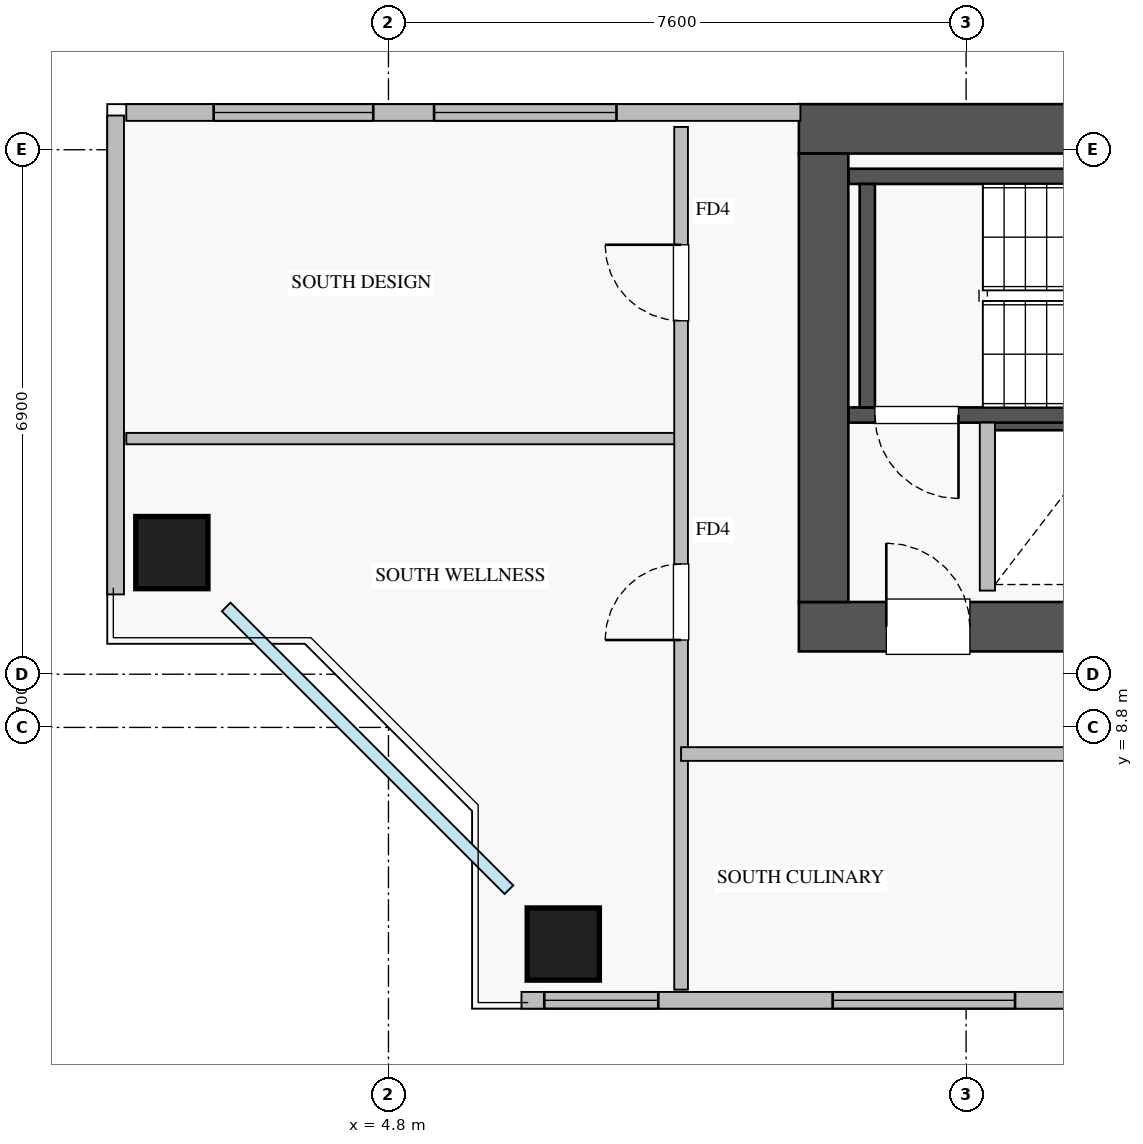
"""IFC4 building model, lengths in metres.
Left out: names, types, materials, properties, quantities, classifications, styles, units other than length and angle.
Written with IfcOpenShell. Run it as: python <this file> out.ifc"""

import sys

from ifc_helpers import new_model, si_unit, direction, frame, frame_2d, origin, origin_2d, place, context, subcontext, project, spatial, rectangle, extrude, source, transform, mapped, element, fill, save


model = new_model("IFC4")
c1 = context("Model", 3, precision=1e-05, world=origin(), true_north=direction((0.0, 1.0)))
c2 = subcontext(c1, "Body", "Model", "MODEL_VIEW")
j1 = project(units=[si_unit("LENGTHUNIT", "METRE"), si_unit("PLANEANGLEUNIT", "RADIAN")], contexts=[c1])
p1 = place(None, origin())
s1 = spatial("IfcSite", under=j1, at=p1, CompositionType="ELEMENT")
p2 = place(p1, origin())
s2 = spatial("IfcBuilding", under=s1, at=p2, CompositionType="ELEMENT")
p3 = place(p2, frame((0.0, 0.0, 163.25)))
s3 = spatial("IfcBuildingStorey", under=s2, at=p3, CompositionType="ELEMENT", Elevation=163.25)
p4 = place(p3, frame((12.68, 12.8, 0.0), z_axis=(0.0, 0.0, 1.0), x_axis=(1.0, 0.0, 0.0)))
e1 = element("IfcWall", 1, at=p4, inside=s3, PredefinedType="SHEAR", context=c2, shape_type="SweptSolid", body=[
    extrude(rectangle(XDim=1.94, YDim=0.18, at=frame_2d((0.97, 0.0))), origin(), (0.0, 0.0, 1.0), 3.07),
])
p5 = place(p3, frame((10.85, 12.91, 0.0), z_axis=(0.0, 0.0, 1.0), x_axis=(1.0, 0.0, 0.0)))
e2 = element("IfcWall", 2, at=p5, inside=s3, PredefinedType="SHEAR", context=c2, shape_type="SweptSolid", body=[
    extrude(rectangle(XDim=7.3, YDim=0.2, at=frame_2d((3.65, 0.0))), origin(), (0.0, 0.0, 1.0), 3.25),
])
p6 = place(p5, frame((0.35, 0.0, 0.0)))
e3 = element("IfcOpeningElement", 3, at=p6, cuts=e2, PredefinedType="OPENING", context=c2, shape_type="SweptSolid", body=[
    extrude(rectangle(XDim=1.1, YDim=2.05, at=frame_2d((0.55, 1.025))), frame((0.0, 0.11, 0.0), z_axis=(0.0, -1.0, 0.0), x_axis=(1.0, 0.0, 0.0)), (0.0, 0.0, 1.0), 0.22),
])
p7 = place(p3, frame((10.85, 16.05, 0.0), z_axis=(0.0, 0.0, 1.0), x_axis=(1.0, 0.0, 0.0)))
e4 = element("IfcWall", 4, at=p7, inside=s3, PredefinedType="SHEAR", context=c2, shape_type="SweptSolid", body=[
    extrude(rectangle(XDim=7.3, YDim=0.2, at=frame_2d((3.65, 0.0))), origin(), (0.0, 0.0, 1.0), 3.25),
])
p8 = place(p3, frame((11.1, 13.01, 0.0), z_axis=(0.0, 0.0, 1.0), x_axis=(0.0, 1.0, 0.0)))
e5 = element("IfcWall", 5, at=p8, inside=s3, PredefinedType="SHEAR", context=c2, shape_type="SweptSolid", body=[
    extrude(rectangle(XDim=2.94, YDim=0.2, at=frame_2d((1.47, 0.0))), origin(), (0.0, 0.0, 1.0), 3.25),
])
p9 = place(p3, frame((10.2, 10.125, 0.0), z_axis=(0.0, 0.0, 1.0), x_axis=(1.0, 0.0, 0.0)))
e6 = element("IfcWall", 6, at=p9, inside=s3, PredefinedType="SHEAR", context=c2, shape_type="SweptSolid", body=[
    extrude(rectangle(XDim=17.6, YDim=0.65, at=frame_2d((8.8, 0.0))), origin(), (0.0, 0.0, 1.0), 3.25),
])
p10 = place(p9, frame((1.15, 0.0, 0.0)))
e7 = element("IfcOpeningElement", 7, at=p10, cuts=e6, PredefinedType="OPENING", context=c2, shape_type="SweptSolid", body=[
    extrude(rectangle(XDim=1.1, YDim=2.05, at=frame_2d((0.55, 1.025))), frame((0.0, 0.335, 0.0), z_axis=(0.0, -1.0, 0.0), x_axis=(1.0, 0.0, 0.0)), (0.0, 0.0, 1.0), 0.67),
])
p11 = place(p9, frame((8.3, 0.0, 0.0)))
e8 = element("IfcOpeningElement", 8, at=p11, cuts=e6, PredefinedType="OPENING", context=c2, shape_type="SweptSolid", body=[
    extrude(rectangle(XDim=1.1, YDim=2.05, at=frame_2d((0.55, 1.025))), frame((0.0, 0.335, 0.0), z_axis=(0.0, -1.0, 0.0), x_axis=(1.0, 0.0, 0.0)), (0.0, 0.0, 1.0), 0.67),
])
p12 = place(p9, frame((4.9, 0.0, 0.0)))
e9 = element("IfcOpeningElement", 9, at=p12, cuts=e6, PredefinedType="OPENING", context=c2, shape_type="SweptSolid", body=[
    extrude(rectangle(XDim=1.1, YDim=2.05, at=frame_2d((0.55, 1.025))), frame((0.0, 0.335, 0.0), z_axis=(0.0, -1.0, 0.0), x_axis=(1.0, 0.0, 0.0)), (0.0, 0.0, 1.0), 0.67),
])
p13 = place(p9, frame((14.74, 0.0, 0.0)))
e10 = element("IfcOpeningElement", 10, at=p13, cuts=e6, PredefinedType="OPENING", context=c2, shape_type="SweptSolid", body=[
    extrude(rectangle(XDim=1.0, YDim=2.05, at=frame_2d((0.5, 1.025))), frame((0.0, 0.335, 0.0), z_axis=(0.0, -1.0, 0.0), x_axis=(1.0, 0.0, 0.0)), (0.0, 0.0, 1.0), 0.67),
])
p14 = place(p9, frame((10.155, 0.0, 0.0)))
e11 = element("IfcOpeningElement", 11, at=p14, cuts=e6, PredefinedType="OPENING", context=c2, shape_type="SweptSolid", body=[
    extrude(rectangle(XDim=1.0, YDim=2.05, at=frame_2d((0.5, 1.025))), frame((0.0, 0.335, 0.0), z_axis=(0.0, -1.0, 0.0), x_axis=(1.0, 0.0, 0.0)), (0.0, 0.0, 1.0), 0.67),
])
p15 = place(p9, frame((11.87, 0.0, 0.0)))
e12 = element("IfcOpeningElement", 12, at=p15, cuts=e6, PredefinedType="OPENING", context=c2, shape_type="SweptSolid", body=[
    extrude(rectangle(XDim=1.0, YDim=2.05, at=frame_2d((0.5, 1.025))), frame((0.0, 0.335, 0.0), z_axis=(0.0, -1.0, 0.0), x_axis=(1.0, 0.0, 0.0)), (0.0, 0.0, 1.0), 0.67),
])
p16 = place(p9, frame((13.46, 0.0, 0.0)))
e13 = element("IfcOpeningElement", 13, at=p16, cuts=e6, PredefinedType="OPENING", context=c2, shape_type="SweptSolid", body=[
    extrude(rectangle(XDim=1.0, YDim=2.05, at=frame_2d((0.5, 1.025))), frame((0.0, 0.335, 0.0), z_axis=(0.0, -1.0, 0.0), x_axis=(1.0, 0.0, 0.0)), (0.0, 0.0, 1.0), 0.67),
])
p17 = place(p3, frame((10.2, 16.675, 0.0), z_axis=(0.0, 0.0, 1.0), x_axis=(1.0, 0.0, 0.0)))
e14 = element("IfcWall", 14, at=p17, inside=s3, PredefinedType="SHEAR", context=c2, shape_type="SweptSolid", body=[
    extrude(rectangle(XDim=17.6, YDim=0.65, at=frame_2d((8.8, 0.0))), origin(), (0.0, 0.0, 1.0), 3.25),
])
p18 = place(p3, frame((10.525, 10.45, 0.0), z_axis=(0.0, 0.0, 1.0), x_axis=(0.0, 1.0, 0.0)))
e15 = element("IfcWall", 15, at=p18, inside=s3, PredefinedType="SHEAR", context=c2, shape_type="SweptSolid", body=[
    extrude(rectangle(XDim=5.9, YDim=0.65, at=frame_2d((2.95, 0.0))), origin(), (0.0, 0.0, 1.0), 3.25),
])
m1 = source(origin(), c2, "Body", "SweptSolid", [
    extrude(rectangle(XDim=0.95, YDim=0.95, at=origin_2d()), origin(), (0.0, 0.0, 1.0), 3.25),
])
for number, where, z_axis, x_axis in (
    (16, (7.1, 5.95, 0.0), (0.0, 0.0, 1.0), (1.0, 0.0, 0.0)),
    (17, (1.95, 11.1, 0.0), (0.0, 0.0, 1.0), (1.0, 0.0, 0.0)),
):
    element("IfcColumn", number, at=place(p3, frame(where, z_axis=z_axis, x_axis=x_axis)), inside=s3, PredefinedType="COLUMN", context=c2, shape_type="MappedRepresentation", body=[
        mapped(m1, transform((0.0, 0.0, 0.0), x_axis=(1.0, 0.0, 0.0), y_axis=(0.0, 1.0, 0.0), z_axis=(0.0, 0.0, 1.0), scale=1.0)),
    ])
p19 = place(p3, frame((1.35, 16.89, 0.0), z_axis=(0.0, 0.0, 1.0), x_axis=(1.0, 0.0, 0.0)))
e18 = element("IfcWall", 18, at=p19, inside=s3, PredefinedType="STANDARD", context=c2, shape_type="SweptSolid", body=[
    extrude(rectangle(XDim=8.87, YDim=0.22, at=frame_2d((4.435, 0.0))), origin(), (0.0, 0.0, 1.0), 2.61),
])
p20 = place(p19, frame((1.15, 0.0, 0.9)))
e19 = element("IfcOpeningElement", 19, at=p20, cuts=e18, PredefinedType="OPENING", context=c2, shape_type="SweptSolid", body=[
    extrude(rectangle(XDim=2.1, YDim=1.48, at=frame_2d((1.05, 0.74))), frame((0.0, 0.12, 0.0), z_axis=(0.0, -1.0, 0.0), x_axis=(1.0, 0.0, 0.0)), (0.0, 0.0, 1.0), 0.24),
])
p21 = place(p19, frame((4.05, 0.0, 0.9)))
e20 = element("IfcOpeningElement", 20, at=p21, cuts=e18, PredefinedType="OPENING", context=c2, shape_type="SweptSolid", body=[
    extrude(rectangle(XDim=2.4, YDim=1.5, at=frame_2d((1.2, 0.75))), frame((0.0, 0.12, 0.0), z_axis=(0.0, -1.0, 0.0), x_axis=(1.0, 0.0, 0.0)), (0.0, 0.0, 1.0), 0.24),
])
p22 = place(p3, frame((1.21, 10.55, 0.0), z_axis=(0.0, 0.0, 1.0), x_axis=(0.0, 1.0, 0.0)))
e21 = element("IfcWall", 21, at=p22, inside=s3, PredefinedType="STANDARD", context=c2, shape_type="SweptSolid", body=[
    extrude(rectangle(XDim=6.3, YDim=0.22, at=frame_2d((3.15, 0.0))), origin(), (0.0, 0.0, 1.0), 2.61),
])
p23 = place(p3, frame((6.55, 5.21, 0.0), z_axis=(0.0, 0.0, 1.0), x_axis=(1.0, 0.0, 0.0)))
e22 = element("IfcWall", 22, at=p23, inside=s3, PredefinedType="STANDARD", context=c2, shape_type="SweptSolid", body=[
    extrude(rectangle(XDim=24.9, YDim=0.22, at=frame_2d((12.45, 0.0))), origin(), (0.0, 0.0, 1.0), 2.61),
])
p24 = place(p23, frame((0.3, 0.0, 0.9)))
e23 = element("IfcOpeningElement", 23, at=p24, cuts=e22, PredefinedType="OPENING", context=c2, shape_type="SweptSolid", body=[
    extrude(rectangle(XDim=1.5, YDim=1.5, at=frame_2d((0.75, 0.75))), frame((0.0, 0.12, 0.0), z_axis=(0.0, -1.0, 0.0), x_axis=(1.0, 0.0, 0.0)), (0.0, 0.0, 1.0), 0.24),
])
p25 = place(p23, frame((8.438, 0.0, 0.9)))
e24 = element("IfcOpeningElement", 24, at=p25, cuts=e22, PredefinedType="OPENING", context=c2, shape_type="SweptSolid", body=[
    extrude(rectangle(XDim=1.8, YDim=1.45, at=frame_2d((0.9, 0.725))), frame((0.0, 0.12, 0.0), z_axis=(0.0, -1.0, 0.0), x_axis=(1.0, 0.0, 0.0)), (0.0, 0.0, 1.0), 0.24),
])
p26 = place(p23, frame((14.813, 0.0, 0.9)))
e25 = element("IfcOpeningElement", 25, at=p26, cuts=e22, PredefinedType="OPENING", context=c2, shape_type="SweptSolid", body=[
    extrude(rectangle(XDim=1.5, YDim=1.45, at=frame_2d((0.75, 0.725))), frame((0.0, 0.12, 0.0), z_axis=(0.0, -1.0, 0.0), x_axis=(1.0, 0.0, 0.0)), (0.0, 0.0, 1.0), 0.24),
])
p27 = place(p23, frame((20.738, 0.0, 0.9)))
e26 = element("IfcOpeningElement", 26, at=p27, cuts=e22, PredefinedType="OPENING", context=c2, shape_type="SweptSolid", body=[
    extrude(rectangle(XDim=2.1, YDim=1.48, at=frame_2d((1.05, 0.74))), frame((0.0, 0.12, 0.0), z_axis=(0.0, -1.0, 0.0), x_axis=(1.0, 0.0, 0.0)), (0.0, 0.0, 1.0), 0.24),
])
p28 = place(p23, frame((4.094, 0.0, 0.9)))
e27 = element("IfcOpeningElement", 27, at=p28, cuts=e22, PredefinedType="OPENING", context=c2, shape_type="SweptSolid", body=[
    extrude(rectangle(XDim=2.4, YDim=1.5, at=frame_2d((1.2, 0.75))), frame((0.0, 0.12, 0.0), z_axis=(0.0, -1.0, 0.0), x_axis=(1.0, 0.0, 0.0)), (0.0, 0.0, 1.0), 0.24),
])
p29 = place(p3, frame((12.68, 10.6, 0.0), z_axis=(0.0, 0.0, 1.0), x_axis=(0.0, 1.0, 0.0)))
e28 = element("IfcWall", 28, at=p29, inside=s3, PredefinedType="PARTITIONING", context=c2, shape_type="SweptSolid", body=[
    extrude(rectangle(XDim=2.21, YDim=0.2, at=frame_2d((1.105, 0.0))), origin(), (0.0, 0.0, 1.0), 3.07),
])
p30 = place(p3, frame((1.35, 12.6, 0.0), z_axis=(0.0, 0.0, 1.0), x_axis=(1.0, 0.0, 0.0)))
e29 = element("IfcWall", 29, at=p30, inside=s3, PredefinedType="PARTITIONING", context=c2, shape_type="SweptSolid", body=[
    extrude(rectangle(XDim=7.3, YDim=0.15, at=frame_2d((3.65, 0.0))), origin(), (0.0, 0.0, 1.0), 3.07),
])
p31 = place(p3, frame((8.65, 5.35, 0.0), z_axis=(0.0, 0.0, 1.0), x_axis=(0.0, 1.0, 0.0)))
e30 = element("IfcWall", 30, at=p31, inside=s3, PredefinedType="PARTITIONING", context=c2, shape_type="SweptSolid", body=[
    extrude(rectangle(XDim=11.35, YDim=0.18, at=frame_2d((5.675, 0.0))), origin(), (0.0, 0.0, 1.0), 3.07),
])
p32 = place(p31, frame((4.6, 0.0, 0.0)))
e31 = element("IfcOpeningElement", 31, at=p32, cuts=e30, PredefinedType="OPENING", context=c2, shape_type="SweptSolid", body=[
    extrude(rectangle(XDim=1.0, YDim=2.05, at=frame_2d((0.5, 1.025))), frame((0.0, 0.1, 0.0), z_axis=(0.0, -1.0, 0.0), x_axis=(1.0, 0.0, 0.0)), (0.0, 0.0, 1.0), 0.2),
])
p33 = place(p31, frame((8.8, 0.0, 0.0)))
e32 = element("IfcOpeningElement", 32, at=p33, cuts=e30, PredefinedType="OPENING", context=c2, shape_type="SweptSolid", body=[
    extrude(rectangle(XDim=1.0, YDim=2.05, at=frame_2d((0.5, 1.025))), frame((0.0, 0.1, 0.0), z_axis=(0.0, -1.0, 0.0), x_axis=(1.0, 0.0, 0.0)), (0.0, 0.0, 1.0), 0.2),
])
p34 = place(p3, frame((8.65, 8.45, 0.0), z_axis=(0.0, 0.0, 1.0), x_axis=(1.0, 0.0, 0.0)))
e33 = element("IfcWall", 33, at=p34, inside=s3, PredefinedType="PARTITIONING", context=c2, shape_type="SweptSolid", body=[
    extrude(rectangle(XDim=23.8, YDim=0.18, at=frame_2d((11.9, 0.0))), origin(), (0.0, 0.0, 1.0), 3.07),
])
p35 = place(p34, frame((5.425, 0.0, 0.0)))
e34 = element("IfcOpeningElement", 34, at=p35, cuts=e33, PredefinedType="OPENING", context=c2, shape_type="SweptSolid", body=[
    extrude(rectangle(XDim=1.0, YDim=2.05, at=frame_2d((0.5, 1.025))), frame((0.0, 0.1, 0.0), z_axis=(0.0, -1.0, 0.0), x_axis=(1.0, 0.0, 0.0)), (0.0, 0.0, 1.0), 0.2),
])
p36 = place(p34, frame((17.325, 0.0, 0.0)))
e35 = element("IfcOpeningElement", 35, at=p36, cuts=e33, PredefinedType="OPENING", context=c2, shape_type="SweptSolid", body=[
    extrude(rectangle(XDim=1.0, YDim=2.05, at=frame_2d((0.5, 1.025))), frame((0.0, 0.1, 0.0), z_axis=(0.0, -1.0, 0.0), x_axis=(1.0, 0.0, 0.0)), (0.0, 0.0, 1.0), 0.2),
])
m2 = source(origin(), c2, "Body", "SweptSolid", [
    extrude(rectangle(XDim=2.1, YDim=1.48, at=frame_2d((1.05, 0.74))), frame((0.0, 0.03, 0.0), z_axis=(0.0, -1.0, 0.0), x_axis=(1.0, 0.0, 0.0)), (0.0, 0.0, 1.0), 0.06),
])
p37 = place(p20, origin())
e36 = element("IfcWindow", 36, at=p37, inside=s3, PartitioningType="TRIPLE_PANEL_VERTICAL", PredefinedType="WINDOW", context=c2, shape_type="MappedRepresentation", body=[
    mapped(m2, transform((0.0, 0.0, 0.0), x_axis=(1.0, 0.0, 0.0), y_axis=(0.0, 1.0, 0.0), z_axis=(0.0, 0.0, 1.0), scale=1.0)),
])
fill(e19, e36)
m3 = source(origin(), c2, "Body", "SweptSolid", [
    extrude(rectangle(XDim=2.4, YDim=1.5, at=frame_2d((1.2, 0.75))), frame((0.0, 0.03, 0.0), z_axis=(0.0, -1.0, 0.0), x_axis=(1.0, 0.0, 0.0)), (0.0, 0.0, 1.0), 0.06),
])
p38 = place(p21, origin())
e37 = element("IfcWindow", 37, at=p38, inside=s3, PartitioningType="TRIPLE_PANEL_VERTICAL", PredefinedType="WINDOW", context=c2, shape_type="MappedRepresentation", body=[
    mapped(m3, transform((0.0, 0.0, 0.0), x_axis=(1.0, 0.0, 0.0), y_axis=(0.0, 1.0, 0.0), z_axis=(0.0, 0.0, 1.0), scale=1.0)),
])
fill(e20, e37)
m4 = source(origin(), c2, "Body", "SweptSolid", [
    extrude(rectangle(XDim=1.5, YDim=1.5, at=frame_2d((0.75, 0.75))), frame((0.0, 0.03, 0.0), z_axis=(0.0, -1.0, 0.0), x_axis=(1.0, 0.0, 0.0)), (0.0, 0.0, 1.0), 0.06),
])
p39 = place(p24, origin())
e38 = element("IfcWindow", 38, at=p39, inside=s3, PartitioningType="TRIPLE_PANEL_VERTICAL", PredefinedType="WINDOW", context=c2, shape_type="MappedRepresentation", body=[
    mapped(m4, transform((0.0, 0.0, 0.0), x_axis=(1.0, 0.0, 0.0), y_axis=(0.0, 1.0, 0.0), z_axis=(0.0, 0.0, 1.0), scale=1.0)),
])
fill(e23, e38)
m5 = source(origin(), c2, "Body", "SweptSolid", [
    extrude(rectangle(XDim=1.1, YDim=2.05, at=frame_2d((0.55, 1.025))), frame((0.0, 0.025, 0.0), z_axis=(0.0, -1.0, 0.0), x_axis=(1.0, 0.0, 0.0)), (0.0, 0.0, 1.0), 0.05),
])
p40 = place(p10, origin())
e39 = element("IfcDoor", 39, at=p40, inside=s3, OperationType="SINGLE_SWING_LEFT", PredefinedType="DOOR", context=c2, shape_type="MappedRepresentation", body=[
    mapped(m5, transform((0.0, 0.0, 0.0), x_axis=(1.0, 0.0, 0.0), y_axis=(0.0, 1.0, 0.0), z_axis=(0.0, 0.0, 1.0), scale=1.0)),
])
fill(e7, e39)
p41 = place(p6, frame((1.1, 0.0, 0.0), z_axis=(0.0, 0.0, 1.0), x_axis=(-1.0, 0.0, 0.0)))
e40 = element("IfcDoor", 40, at=p41, inside=s3, OperationType="SINGLE_SWING_RIGHT", PredefinedType="DOOR", context=c2, shape_type="MappedRepresentation", body=[
    mapped(m5, transform((0.0, 0.0, 0.0), x_axis=(1.0, 0.0, 0.0), y_axis=(0.0, 1.0, 0.0), z_axis=(0.0, 0.0, 1.0), scale=1.0)),
])
fill(e3, e40)
m6 = source(origin(), c2, "Body", "SweptSolid", [
    extrude(rectangle(XDim=1.0, YDim=2.05, at=frame_2d((0.5, 1.025))), frame((0.0, 0.025, 0.0), z_axis=(0.0, -1.0, 0.0), x_axis=(1.0, 0.0, 0.0)), (0.0, 0.0, 1.0), 0.05),
])
p42 = place(p32, origin())
e41 = element("IfcDoor", 41, at=p42, inside=s3, OperationType="SINGLE_SWING_LEFT", PredefinedType="DOOR", context=c2, shape_type="MappedRepresentation", body=[
    mapped(m6, transform((0.0, 0.0, 0.0), x_axis=(1.0, 0.0, 0.0), y_axis=(0.0, 1.0, 0.0), z_axis=(0.0, 0.0, 1.0), scale=1.0)),
])
fill(e31, e41)
p43 = place(p33, origin())
e42 = element("IfcDoor", 42, at=p43, inside=s3, OperationType="SINGLE_SWING_RIGHT", PredefinedType="DOOR", context=c2, shape_type="MappedRepresentation", body=[
    mapped(m6, transform((0.0, 0.0, 0.0), x_axis=(1.0, 0.0, 0.0), y_axis=(0.0, 1.0, 0.0), z_axis=(0.0, 0.0, 1.0), scale=1.0)),
])
fill(e32, e42)
p44 = place(p28, origin())
e43 = element("IfcWindow", 43, at=p44, inside=s3, PartitioningType="TRIPLE_PANEL_VERTICAL", PredefinedType="WINDOW", context=c2, shape_type="MappedRepresentation", body=[
    mapped(m3, transform((0.0, 0.0, 0.0), x_axis=(1.0, 0.0, 0.0), y_axis=(0.0, 1.0, 0.0), z_axis=(0.0, 0.0, 1.0), scale=1.0)),
])
fill(e27, e43)
save(model, sys.argv[1])
